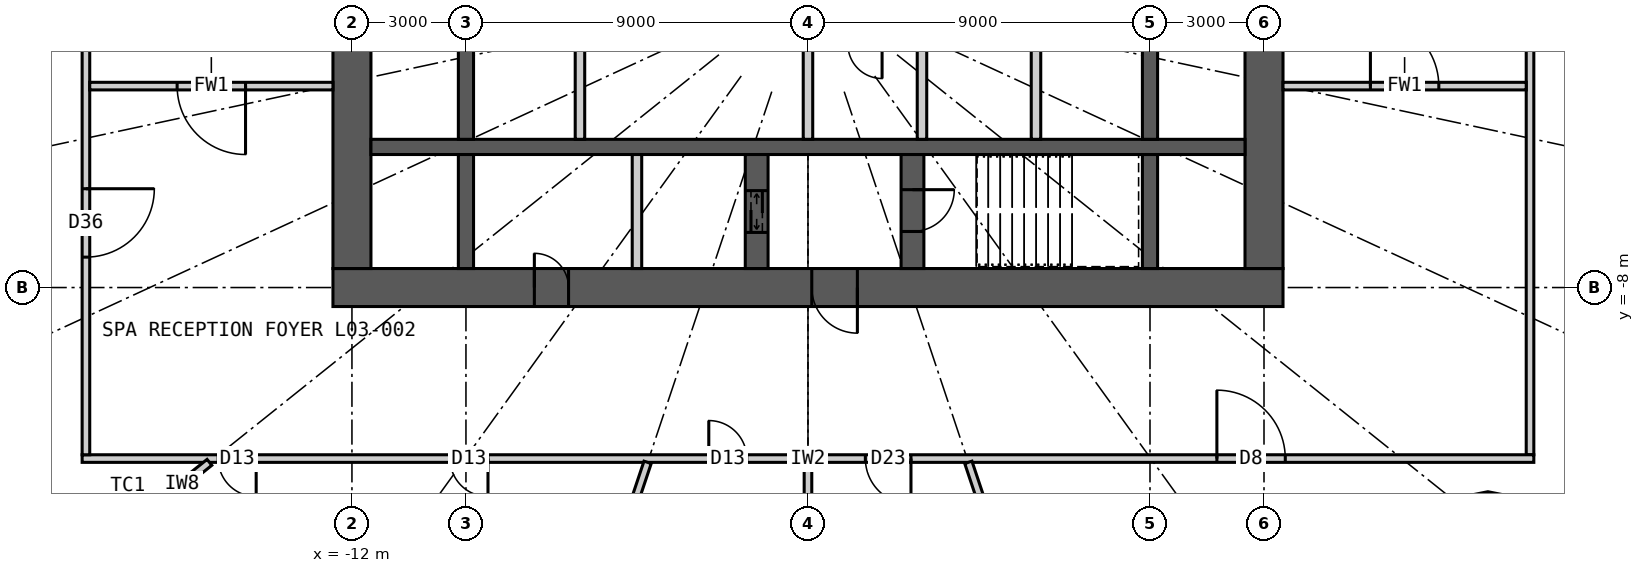
"""IFC4 building model, lengths in metres.
Left out: names, types, materials, properties, quantities, classifications, styles, units other than length and angle.
Written with IfcOpenShell. Run it as: python <this file> out.ifc"""

import sys

from ifc_helpers import new_model, si_unit, direction, frame, frame_2d, origin, place, context, subcontext, project, spatial, rectangle, extrude, element, fill, save


model = new_model("IFC4")
c1 = context("Model", 3, precision=1e-05, world=origin(), true_north=direction((0.0, 1.0)))
c2 = subcontext(c1, "Body", "Model", "MODEL_VIEW")
j1 = project(units=[si_unit("LENGTHUNIT", "METRE"), si_unit("PLANEANGLEUNIT", "RADIAN")], contexts=[c1])
p1 = place(None, origin())
s1 = spatial("IfcSite", under=j1, at=p1, CompositionType="ELEMENT")
p2 = place(p1, origin())
s2 = spatial("IfcBuilding", under=s1, at=p2, CompositionType="ELEMENT")
p3 = place(p2, frame((0.0, 0.0, 19.2)))
s3 = spatial("IfcBuildingStorey", under=s2, at=p3, CompositionType="ELEMENT", Elevation=19.2)
p4 = place(p3, frame((12.5, -8.0, 0.0), z_axis=(0.0, 0.0, 1.0), x_axis=(-1.0, 0.0, 0.0)))
e1 = element("IfcWall", 1, at=p4, inside=s3, PredefinedType="SHEAR", context=c2, shape_type="SweptSolid", body=[
    extrude(rectangle(XDim=25.0, YDim=1.0, at=frame_2d((12.5, 0.0))), origin(), (0.0, 0.0, 1.0), 5.4),
])
p5 = place(p4, frame((11.2, 0.0, 0.0)))
e2 = element("IfcOpeningElement", 2, at=p5, cuts=e1, PredefinedType="OPENING", context=c2, shape_type="SweptSolid", body=[
    extrude(rectangle(XDim=1.2, YDim=2.2, at=frame_2d((0.6, 1.1))), frame((0.0, 0.51, 0.0), z_axis=(0.0, -1.0, 0.0), x_axis=(1.0, 0.0, 0.0)), (0.0, 0.0, 1.0), 1.02),
])
p6 = place(p4, frame((18.8, 0.0, 0.0)))
e3 = element("IfcOpeningElement", 3, at=p6, cuts=e1, PredefinedType="OPENING", context=c2, shape_type="SweptSolid", body=[
    extrude(rectangle(XDim=0.9, YDim=2.2, at=frame_2d((0.45, 1.1))), frame((0.0, 0.51, 0.0), z_axis=(0.0, -1.0, 0.0), x_axis=(1.0, 0.0, 0.0)), (0.0, 0.0, 1.0), 1.02),
])
p7 = place(p3, frame((12.0, -7.5, 0.0), z_axis=(0.0, 0.0, 1.0), x_axis=(0.0, 1.0, 0.0)))
e4 = element("IfcWall", 4, at=p7, inside=s3, PredefinedType="SHEAR", context=c2, shape_type="SweptSolid", body=[
    extrude(rectangle(XDim=15.0, YDim=1.0, at=frame_2d((7.5, 0.0))), origin(), (0.0, 0.0, 1.0), 5.4),
])
p8 = place(p7, frame((6.6, 0.0, 0.0)))
e5 = element("IfcOpeningElement", 5, at=p8, cuts=e4, PredefinedType="OPENING", context=c2, shape_type="SweptSolid", body=[
    extrude(rectangle(XDim=1.8, YDim=2.2, at=frame_2d((0.9, 1.1))), frame((0.0, 0.51, 0.0), z_axis=(0.0, -1.0, 0.0), x_axis=(1.0, 0.0, 0.0)), (0.0, 0.0, 1.0), 1.02),
])
p9 = place(p3, frame((-12.0, 7.5, 0.0), z_axis=(0.0, 0.0, 1.0), x_axis=(0.0, -1.0, 0.0)))
e6 = element("IfcWall", 6, at=p9, inside=s3, PredefinedType="SHEAR", context=c2, shape_type="SweptSolid", body=[
    extrude(rectangle(XDim=15.0, YDim=1.0, at=frame_2d((7.5, 0.0))), origin(), (0.0, 0.0, 1.0), 5.4),
])
p10 = place(p9, frame((6.6, 0.0, 0.0)))
e7 = element("IfcOpeningElement", 7, at=p10, cuts=e6, PredefinedType="OPENING", context=c2, shape_type="SweptSolid", body=[
    extrude(rectangle(XDim=1.8, YDim=2.2, at=frame_2d((0.9, 1.1))), frame((0.0, 0.51, 0.0), z_axis=(0.0, -1.0, 0.0), x_axis=(1.0, 0.0, 0.0)), (0.0, 0.0, 1.0), 1.02),
])
p11 = place(p3, frame((-11.5, -4.3, 0.0), z_axis=(0.0, 0.0, 1.0), x_axis=(1.0, 0.0, 0.0)))
e8 = element("IfcWall", 8, at=p11, inside=s3, PredefinedType="SHEAR", context=c2, shape_type="SweptSolid", body=[
    extrude(rectangle(XDim=23.0, YDim=0.4, at=frame_2d((11.5, 0.0))), origin(), (0.0, 0.0, 1.0), 5.4),
])
p12 = place(p3, frame((-9.0, -4.1, 0.0), z_axis=(0.0, 0.0, 1.0), x_axis=(0.0, 1.0, 0.0)))
e9 = element("IfcWall", 9, at=p12, inside=s3, PredefinedType="SHEAR", context=c2, shape_type="SweptSolid", body=[
    extrude(rectangle(XDim=2.35, YDim=0.4, at=frame_2d((1.175, 0.0))), origin(), (0.0, 0.0, 1.0), 5.4),
])
p13 = place(p3, frame((-9.0, -7.5, 0.0), z_axis=(0.0, 0.0, 1.0), x_axis=(0.0, 1.0, 0.0)))
e10 = element("IfcWall", 10, at=p13, inside=s3, PredefinedType="SHEAR", context=c2, shape_type="SweptSolid", body=[
    extrude(rectangle(XDim=3.0, YDim=0.4, at=frame_2d((1.5, 0.0))), origin(), (0.0, 0.0, 1.0), 5.4),
])
p14 = place(p3, frame((9.0, -4.1, 0.0), z_axis=(0.0, 0.0, 1.0), x_axis=(0.0, 1.0, 0.0)))
e11 = element("IfcWall", 11, at=p14, inside=s3, PredefinedType="SHEAR", context=c2, shape_type="SweptSolid", body=[
    extrude(rectangle(XDim=2.35, YDim=0.4, at=frame_2d((1.175, 0.0))), origin(), (0.0, 0.0, 1.0), 5.4),
])
p15 = place(p3, frame((9.0, -7.5, 0.0), z_axis=(0.0, 0.0, 1.0), x_axis=(0.0, 1.0, 0.0)))
e12 = element("IfcWall", 12, at=p15, inside=s3, PredefinedType="SHEAR", context=c2, shape_type="SweptSolid", body=[
    extrude(rectangle(XDim=3.0, YDim=0.4, at=frame_2d((1.5, 0.0))), origin(), (0.0, 0.0, 1.0), 5.4),
])
p16 = place(p3, frame((2.75, -7.5, 0.0), z_axis=(0.0, 0.0, 1.0), x_axis=(0.0, 1.0, 0.0)))
e13 = element("IfcWall", 13, at=p16, inside=s3, PredefinedType="SHEAR", context=c2, shape_type="SweptSolid", body=[
    extrude(rectangle(XDim=3.0, YDim=0.6, at=frame_2d((1.5, 0.0))), origin(), (0.0, 0.0, 1.0), 5.4),
])
p17 = place(p16, frame((0.975, 0.0, 0.0)))
e14 = element("IfcOpeningElement", 14, at=p17, cuts=e13, PredefinedType="OPENING", context=c2, shape_type="SweptSolid", body=[
    extrude(rectangle(XDim=1.1, YDim=2.2, at=frame_2d((0.55, 1.1))), frame((0.0, 0.31, 0.0), z_axis=(0.0, -1.0, 0.0), x_axis=(1.0, 0.0, 0.0)), (0.0, 0.0, 1.0), 0.62),
])
p18 = place(p3, frame((-1.35, -7.5, 0.0), z_axis=(0.0, 0.0, 1.0), x_axis=(0.0, 1.0, 0.0)))
e15 = element("IfcWall", 15, at=p18, inside=s3, PredefinedType="SHEAR", context=c2, shape_type="SweptSolid", body=[
    extrude(rectangle(XDim=3.0, YDim=0.6, at=frame_2d((1.5, 0.0))), origin(), (0.0, 0.0, 1.0), 5.4),
])
p19 = place(p18, frame((0.95, 0.0, 0.0)))
e16 = element("IfcOpeningElement", 16, at=p19, cuts=e15, PredefinedType="OPENING", context=c2, shape_type="SweptSolid", body=[
    extrude(rectangle(XDim=1.1, YDim=2.2, at=frame_2d((0.55, 1.1))), frame((0.0, 0.31, 0.0), z_axis=(0.0, -1.0, 0.0), x_axis=(1.0, 0.0, 0.0)), (0.0, 0.0, 1.0), 0.62),
])
p20 = place(p3, frame((-4.5, -7.5, 0.0), z_axis=(0.0, 0.0, 1.0), x_axis=(0.0, 1.0, 0.0)))
e17 = element("IfcWall", 17, at=p20, inside=s3, PredefinedType="PARTITIONING", context=c2, shape_type="SweptSolid", body=[
    extrude(rectangle(XDim=3.0, YDim=0.25, at=frame_2d((1.5, 0.0))), origin(), (0.0, 0.0, 1.0), 5.4),
])
for number, where, z_axis, x_axis in (
    (18, (-6.0, -4.1, 0.0), (0.0, 0.0, 1.0), (0.0, 1.0, 0.0)),
    (19, (0.0, -4.1, 0.0), (0.0, 0.0, 1.0), (0.0, 1.0, 0.0)),
    (20, (3.0, -4.1, 0.0), (0.0, 0.0, 1.0), (0.0, 1.0, 0.0)),
    (21, (6.0, -4.1, 0.0), (0.0, 0.0, 1.0), (0.0, 1.0, 0.0)),
):
    element("IfcWall", number, at=place(p3, frame(where, z_axis=z_axis, x_axis=x_axis)), inside=s3, PredefinedType="PARTITIONING", context=c2, shape_type="SweptSolid", body=[
        extrude(rectangle(XDim=2.35, YDim=0.25, at=frame_2d((1.175, 0.0))), origin(), (0.0, 0.0, 1.0), 5.4),
    ])
p21 = place(p3, frame((19.0, -12.4, 0.0), z_axis=(0.0, 0.0, 1.0), x_axis=(0.0, 1.0, 0.0)))
e22 = element("IfcWall", 22, at=p21, inside=s3, PredefinedType="PARTITIONING", context=c2, shape_type="SweptSolid", body=[
    extrude(rectangle(XDim=24.8, YDim=0.2, at=frame_2d((12.4, 0.0))), origin(), (0.0, 0.0, 1.0), 5.15),
])
p22 = place(p21, frame((17.8, 0.0, 0.0)))
e23 = element("IfcOpeningElement", 23, at=p22, cuts=e22, PredefinedType="OPENING", context=c2, shape_type="SweptSolid", body=[
    extrude(rectangle(XDim=1.8, YDim=2.4, at=frame_2d((0.9, 1.2))), frame((0.0, 0.11, 0.0), z_axis=(0.0, -1.0, 0.0), x_axis=(1.0, 0.0, 0.0)), (0.0, 0.0, 1.0), 0.22),
])
p23 = place(p3, frame((19.1, -12.5, 0.0), z_axis=(0.0, 0.0, 1.0), x_axis=(-1.0, 0.0, 0.0)))
e24 = element("IfcWall", 24, at=p23, inside=s3, PredefinedType="PARTITIONING", context=c2, shape_type="SweptSolid", body=[
    extrude(rectangle(XDim=38.2, YDim=0.2, at=frame_2d((19.1, 0.0))), origin(), (0.0, 0.0, 1.0), 5.15),
])
p24 = place(p23, frame((6.54, 0.0, 0.0)))
e25 = element("IfcOpeningElement", 25, at=p24, cuts=e24, PredefinedType="OPENING", context=c2, shape_type="SweptSolid", body=[
    extrude(rectangle(XDim=1.8, YDim=2.4, at=frame_2d((0.9, 1.2))), frame((0.0, 0.11, 0.0), z_axis=(0.0, -1.0, 0.0), x_axis=(1.0, 0.0, 0.0)), (0.0, 0.0, 1.0), 0.22),
])
p25 = place(p23, frame((27.52, 0.0, 0.0)))
e26 = element("IfcOpeningElement", 26, at=p25, cuts=e24, PredefinedType="OPENING", context=c2, shape_type="SweptSolid", body=[
    extrude(rectangle(XDim=1.0, YDim=2.2, at=frame_2d((0.5, 1.1))), frame((0.0, 0.11, 0.0), z_axis=(0.0, -1.0, 0.0), x_axis=(1.0, 0.0, 0.0)), (0.0, 0.0, 1.0), 0.22),
])
p26 = place(p23, frame((20.71, 0.0, 0.0)))
e27 = element("IfcOpeningElement", 27, at=p26, cuts=e24, PredefinedType="OPENING", context=c2, shape_type="SweptSolid", body=[
    extrude(rectangle(XDim=1.0, YDim=2.2, at=frame_2d((0.5, 1.1))), frame((0.0, 0.11, 0.0), z_axis=(0.0, -1.0, 0.0), x_axis=(1.0, 0.0, 0.0)), (0.0, 0.0, 1.0), 0.22),
])
p27 = place(p23, frame((16.39, 0.0, 0.0)))
e28 = element("IfcOpeningElement", 28, at=p27, cuts=e24, PredefinedType="OPENING", context=c2, shape_type="SweptSolid", body=[
    extrude(rectangle(XDim=1.2, YDim=2.2, at=frame_2d((0.6, 1.1))), frame((0.0, 0.11, 0.0), z_axis=(0.0, -1.0, 0.0), x_axis=(1.0, 0.0, 0.0)), (0.0, 0.0, 1.0), 0.22),
])
p28 = place(p23, frame((33.62, 0.0, 0.0)))
e29 = element("IfcOpeningElement", 29, at=p28, cuts=e24, PredefinedType="OPENING", context=c2, shape_type="SweptSolid", body=[
    extrude(rectangle(XDim=1.0, YDim=2.2, at=frame_2d((0.5, 1.1))), frame((0.0, 0.11, 0.0), z_axis=(0.0, -1.0, 0.0), x_axis=(1.0, 0.0, 0.0)), (0.0, 0.0, 1.0), 0.22),
])
p29 = place(p3, frame((-19.0, 12.4, 0.0), z_axis=(0.0, 0.0, 1.0), x_axis=(0.0, -1.0, 0.0)))
e30 = element("IfcWall", 30, at=p29, inside=s3, PredefinedType="PARTITIONING", context=c2, shape_type="SweptSolid", body=[
    extrude(rectangle(XDim=24.8, YDim=0.2, at=frame_2d((12.4, 0.0))), origin(), (0.0, 0.0, 1.0), 5.15),
])
p30 = place(p29, frame((5.2, 0.0, 0.0)))
e31 = element("IfcOpeningElement", 31, at=p30, cuts=e30, PredefinedType="OPENING", context=c2, shape_type="SweptSolid", body=[
    extrude(rectangle(XDim=1.8, YDim=2.4, at=frame_2d((0.9, 1.2))), frame((0.0, 0.11, 0.0), z_axis=(0.0, -1.0, 0.0), x_axis=(1.0, 0.0, 0.0)), (0.0, 0.0, 1.0), 0.22),
])
p31 = place(p29, frame((17.8, 0.0, 0.0)))
e32 = element("IfcOpeningElement", 32, at=p31, cuts=e30, PredefinedType="OPENING", context=c2, shape_type="SweptSolid", body=[
    extrude(rectangle(XDim=1.8, YDim=2.4, at=frame_2d((0.9, 1.2))), frame((0.0, 0.11, 0.0), z_axis=(0.0, -1.0, 0.0), x_axis=(1.0, 0.0, 0.0)), (0.0, 0.0, 1.0), 0.22),
])
p32 = place(p3, frame((-15.75, -12.6, 0.0), z_axis=(0.0, 0.0, 1.0), x_axis=(-0.780881734892, -0.6246788904, 0.0)))
e33 = element("IfcWall", 33, at=p32, inside=s3, PredefinedType="PARTITIONING", context=c2, shape_type="SweptSolid", body=[
    extrude(rectangle(XDim=1.843, YDim=0.2, at=frame_2d((0.921, 0.0))), origin(), (0.0, 0.0, 1.0), 4.3),
])
p33 = place(p3, frame((-4.22, -12.6, 0.0), z_axis=(0.0, 0.0, 1.0), x_axis=(-0.317584173452, -0.9482300843, 0.0)))
e34 = element("IfcWall", 34, at=p33, inside=s3, PredefinedType="PARTITIONING", context=c2, shape_type="SweptSolid", body=[
    extrude(rectangle(XDim=6.262, YDim=0.2, at=frame_2d((3.131, 0.0))), origin(), (0.0, 0.0, 1.0), 4.3),
])
p34 = place(p3, frame((0.0, -12.6, 0.0), z_axis=(0.0, 0.0, 1.0), x_axis=(0.0, -1.0, 0.0)))
e35 = element("IfcWall", 35, at=p34, inside=s3, PredefinedType="PARTITIONING", context=c2, shape_type="SweptSolid", body=[
    extrude(rectangle(XDim=6.55, YDim=0.2, at=frame_2d((3.275, 0.0))), origin(), (0.0, 0.0, 1.0), 4.3),
])
p35 = place(p3, frame((4.22, -12.6, 0.0), z_axis=(0.0, 0.0, 1.0), x_axis=(0.317584173452, -0.9482300843, 0.0)))
e36 = element("IfcWall", 36, at=p35, inside=s3, PredefinedType="PARTITIONING", context=c2, shape_type="SweptSolid", body=[
    extrude(rectangle(XDim=6.262, YDim=0.2, at=frame_2d((3.131, 0.0))), origin(), (0.0, 0.0, 1.0), 4.3),
])
p36 = place(p3, frame((-18.9, -2.7, 0.0), z_axis=(0.0, 0.0, 1.0), x_axis=(1.0, 0.0, 0.0)))
e37 = element("IfcWall", 37, at=p36, inside=s3, PredefinedType="PARTITIONING", context=c2, shape_type="SweptSolid", body=[
    extrude(rectangle(XDim=6.4, YDim=0.2, at=frame_2d((3.2, 0.0))), origin(), (0.0, 0.0, 1.0), 5.15),
])
p37 = place(p36, frame((2.3, 0.0, 0.0)))
e38 = element("IfcOpeningElement", 38, at=p37, cuts=e37, PredefinedType="OPENING", context=c2, shape_type="SweptSolid", body=[
    extrude(rectangle(XDim=1.8, YDim=2.4, at=frame_2d((0.9, 1.2))), frame((0.0, 0.11, 0.0), z_axis=(0.0, -1.0, 0.0), x_axis=(1.0, 0.0, 0.0)), (0.0, 0.0, 1.0), 0.22),
])
p38 = place(p3, frame((18.9, -2.7, 0.0), z_axis=(0.0, 0.0, 1.0), x_axis=(-1.0, 0.0, 0.0)))
e39 = element("IfcWall", 39, at=p38, inside=s3, PredefinedType="PARTITIONING", context=c2, shape_type="SweptSolid", body=[
    extrude(rectangle(XDim=6.4, YDim=0.2, at=frame_2d((3.2, 0.0))), origin(), (0.0, 0.0, 1.0), 5.15),
])
p39 = place(p38, frame((2.3, 0.0, 0.0)))
e40 = element("IfcOpeningElement", 40, at=p39, cuts=e39, PredefinedType="OPENING", context=c2, shape_type="SweptSolid", body=[
    extrude(rectangle(XDim=1.8, YDim=2.4, at=frame_2d((0.9, 1.2))), frame((0.0, 0.11, 0.0), z_axis=(0.0, -1.0, 0.0), x_axis=(1.0, 0.0, 0.0)), (0.0, 0.0, 1.0), 0.22),
])
p40 = place(p24, origin())
e41 = element("IfcDoor", 41, at=p40, inside=s3, OperationType="DOUBLE_DOOR_DOUBLE_SWING", PredefinedType="DOOR", context=c2, shape_type="SweptSolid", body=[
    extrude(rectangle(XDim=1.8, YDim=2.4, at=frame_2d((0.9, 1.2))), frame((0.0, 0.025, 0.0), z_axis=(0.0, -1.0, 0.0), x_axis=(1.0, 0.0, 0.0)), (0.0, 0.0, 1.0), 0.05),
])
fill(e25, e41)
p41 = place(p31, origin())
e42 = element("IfcDoor", 42, at=p41, inside=s3, OperationType="DOUBLE_DOOR_DOUBLE_SWING", PredefinedType="DOOR", context=c2, shape_type="SweptSolid", body=[
    extrude(rectangle(XDim=1.8, YDim=2.4, at=frame_2d((0.9, 1.2))), frame((0.0, 0.025, 0.0), z_axis=(0.0, -1.0, 0.0), x_axis=(1.0, 0.0, 0.0)), (0.0, 0.0, 1.0), 0.05),
])
fill(e32, e42)
p42 = place(p25, origin())
e43 = element("IfcDoor", 43, at=p42, inside=s3, OperationType="SINGLE_SWING_LEFT", PredefinedType="DOOR", context=c2, shape_type="SweptSolid", body=[
    extrude(rectangle(XDim=1.0, YDim=2.2, at=frame_2d((0.5, 1.1))), frame((0.0, 0.025, 0.0), z_axis=(0.0, -1.0, 0.0), x_axis=(1.0, 0.0, 0.0)), (0.0, 0.0, 1.0), 0.05),
])
fill(e26, e43)
p43 = place(p26, origin())
e44 = element("IfcDoor", 44, at=p43, inside=s3, OperationType="SINGLE_SWING_RIGHT", PredefinedType="DOOR", context=c2, shape_type="SweptSolid", body=[
    extrude(rectangle(XDim=1.0, YDim=2.2, at=frame_2d((0.5, 1.1))), frame((0.0, 0.025, 0.0), z_axis=(0.0, -1.0, 0.0), x_axis=(1.0, 0.0, 0.0)), (0.0, 0.0, 1.0), 0.05),
])
fill(e27, e44)
p44 = place(p27, origin())
e45 = element("IfcDoor", 45, at=p44, inside=s3, OperationType="SINGLE_SWING_LEFT", PredefinedType="DOOR", context=c2, shape_type="SweptSolid", body=[
    extrude(rectangle(XDim=1.2, YDim=2.2, at=frame_2d((0.6, 1.1))), frame((0.0, 0.025, 0.0), z_axis=(0.0, -1.0, 0.0), x_axis=(1.0, 0.0, 0.0)), (0.0, 0.0, 1.0), 0.05),
])
fill(e28, e45)
p45 = place(p37, origin())
e46 = element("IfcDoor", 46, at=p45, inside=s3, OperationType="DOUBLE_DOOR_DOUBLE_SWING", PredefinedType="DOOR", context=c2, shape_type="SweptSolid", body=[
    extrude(rectangle(XDim=1.8, YDim=2.4, at=frame_2d((0.9, 1.2))), frame((0.0, 0.025, 0.0), z_axis=(0.0, -1.0, 0.0), x_axis=(1.0, 0.0, 0.0)), (0.0, 0.0, 1.0), 0.05),
])
fill(e38, e46)
p46 = place(p39, origin())
e47 = element("IfcDoor", 47, at=p46, inside=s3, OperationType="DOUBLE_DOOR_DOUBLE_SWING", PredefinedType="DOOR", context=c2, shape_type="SweptSolid", body=[
    extrude(rectangle(XDim=1.8, YDim=2.4, at=frame_2d((0.9, 1.2))), frame((0.0, 0.025, 0.0), z_axis=(0.0, -1.0, 0.0), x_axis=(1.0, 0.0, 0.0)), (0.0, 0.0, 1.0), 0.05),
])
fill(e40, e47)
p47 = place(p5, origin())
e48 = element("IfcDoor", 48, at=p47, inside=s3, OperationType="SINGLE_SWING_LEFT", PredefinedType="DOOR", context=c2, shape_type="SweptSolid", body=[
    extrude(rectangle(XDim=1.2, YDim=2.2, at=frame_2d((0.6, 1.1))), frame((0.0, 0.025, 0.0), z_axis=(0.0, -1.0, 0.0), x_axis=(1.0, 0.0, 0.0)), (0.0, 0.0, 1.0), 0.05),
])
fill(e2, e48)
p48 = place(p17, origin())
e49 = element("IfcDoor", 49, at=p48, inside=s3, OperationType="SINGLE_SWING_RIGHT", PredefinedType="DOOR", context=c2, shape_type="SweptSolid", body=[
    extrude(rectangle(XDim=1.1, YDim=2.2, at=frame_2d((0.55, 1.1))), frame((0.0, 0.025, 0.0), z_axis=(0.0, -1.0, 0.0), x_axis=(1.0, 0.0, 0.0)), (0.0, 0.0, 1.0), 0.05),
])
fill(e14, e49)
p49 = place(p19, origin())
e50 = element("IfcDoor", 50, at=p49, inside=s3, OperationType="DOUBLE_DOOR_SLIDING", PredefinedType="DOOR", context=c2, shape_type="SweptSolid", body=[
    extrude(rectangle(XDim=1.1, YDim=2.2, at=frame_2d((0.55, 1.1))), frame((0.0, 0.025, 0.0), z_axis=(0.0, -1.0, 0.0), x_axis=(1.0, 0.0, 0.0)), (0.0, 0.0, 1.0), 0.05),
])
fill(e16, e50)
p50 = place(p6, origin())
e51 = element("IfcDoor", 51, at=p50, inside=s3, OperationType="SINGLE_SWING_RIGHT", PredefinedType="DOOR", context=c2, shape_type="SweptSolid", body=[
    extrude(rectangle(XDim=0.9, YDim=2.2, at=frame_2d((0.45, 1.1))), frame((0.0, 0.025, 0.0), z_axis=(0.0, -1.0, 0.0), x_axis=(1.0, 0.0, 0.0)), (0.0, 0.0, 1.0), 0.05),
])
fill(e3, e51)
p51 = place(p28, origin())
e52 = element("IfcDoor", 52, at=p51, inside=s3, OperationType="SINGLE_SWING_LEFT", PredefinedType="DOOR", context=c2, shape_type="SweptSolid", body=[
    extrude(rectangle(XDim=1.0, YDim=2.2, at=frame_2d((0.5, 1.1))), frame((0.0, 0.025, 0.0), z_axis=(0.0, -1.0, 0.0), x_axis=(1.0, 0.0, 0.0)), (0.0, 0.0, 1.0), 0.05),
])
fill(e29, e52)
save(model, sys.argv[1])
